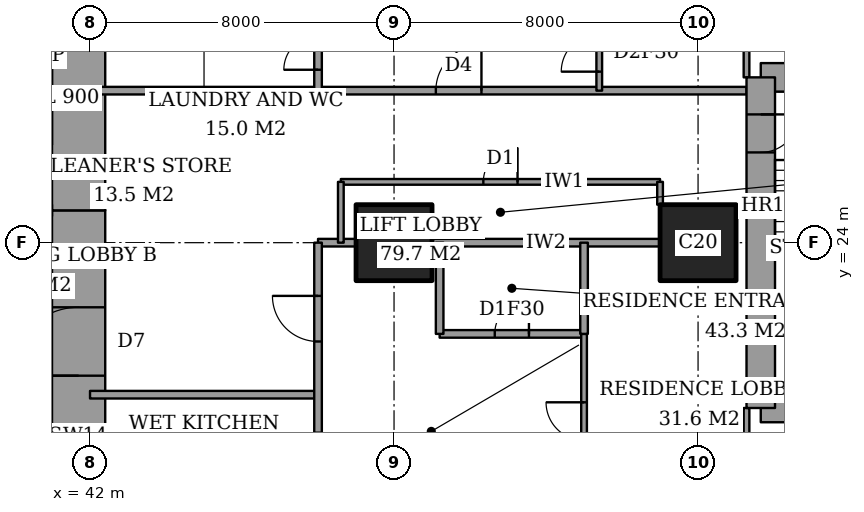
"""IFC4 building model, lengths in metres.
Left out: names, types, materials, properties, quantities, classifications, styles, units other than length and angle.
Written with IfcOpenShell. Run it as: python <this file> out.ifc"""

import sys

from ifc_helpers import new_model, si_unit, direction, frame, frame_2d, origin, origin_2d, place, context, subcontext, project, spatial, rectangle, extrude, element, fill, save


model = new_model("IFC4")
c1 = context("Model", 3, precision=1e-05, world=origin(), true_north=direction((0.0, 1.0)))
c2 = subcontext(c1, "Body", "Model", "MODEL_VIEW")
j1 = project(units=[si_unit("LENGTHUNIT", "METRE"), si_unit("PLANEANGLEUNIT", "RADIAN")], contexts=[c1])
p1 = place(None, origin())
s1 = spatial("IfcSite", under=j1, at=p1, CompositionType="ELEMENT")
p2 = place(p1, origin())
s2 = spatial("IfcBuilding", under=s1, at=p2, CompositionType="ELEMENT")
p3 = place(p2, frame((0.0, 0.0, 65.6)))
s3 = spatial("IfcBuildingStorey", under=s2, at=p3, CompositionType="ELEMENT", Elevation=65.6)
for number, where, z_axis, x_axis in (
    (1, (50.0, 24.0, 0.0), (0.0, 0.0, 1.0), (1.0, 0.0, 0.0)),
    (2, (58.0, 24.0, 0.0), (0.0, 0.0, 1.0), (1.0, 0.0, 0.0)),
):
    element("IfcColumn", number, at=place(p3, frame(where, z_axis=z_axis, x_axis=x_axis)), inside=s3, PredefinedType="COLUMN", context=c2, shape_type="SweptSolid", body=[
        extrude(rectangle(XDim=2.0, YDim=2.0, at=origin_2d()), origin(), (0.0, 0.0, 1.0), 3.6),
    ])
p4 = place(p3, frame((41.7, 13.0, 0.0), z_axis=(0.0, 0.0, 1.0), x_axis=(0.0, 1.0, 0.0)))
e3 = element("IfcWall", 3, at=p4, inside=s3, PredefinedType="SHEAR", context=c2, shape_type="SweptSolid", body=[
    extrude(rectangle(XDim=11.85, YDim=1.4, at=frame_2d((5.925, 0.0))), origin(), (0.0, 0.0, 1.0), 3.6),
])
p5 = place(p4, frame((7.5, 0.0, 0.0)))
e4 = element("IfcOpeningElement", 4, at=p5, cuts=e3, PredefinedType="OPENING", context=c2, shape_type="SweptSolid", body=[
    extrude(rectangle(XDim=1.8, YDim=2.4, at=frame_2d((0.9, 1.2))), frame((0.0, 0.71, 0.0), z_axis=(0.0, -1.0, 0.0), x_axis=(1.0, 0.0, 0.0)), (0.0, 0.0, 1.0), 1.42),
])
p6 = place(p3, frame((41.7, 24.85, 0.0), z_axis=(0.0, 0.0, 1.0), x_axis=(0.0, 1.0, 0.0)))
e5 = element("IfcWall", 5, at=p6, inside=s3, PredefinedType="SHEAR", context=c2, shape_type="SweptSolid", body=[
    extrude(rectangle(XDim=10.15, YDim=1.4, at=frame_2d((5.075, 0.0))), origin(), (0.0, 0.0, 1.0), 3.6),
])
for number, where, z_axis, x_axis in (
    (6, (59.65, 19.65, 0.0), (0.0, 0.0, 1.0), (1.0, 0.0, 0.0)),
    (7, (64.1, 28.35, 0.0), (0.0, 0.0, 1.0), (-1.0, 0.0, 0.0)),
):
    element("IfcWall", number, at=place(p3, frame(where, z_axis=z_axis, x_axis=x_axis)), inside=s3, PredefinedType="SHEAR", context=c2, shape_type="SweptSolid", body=[
        extrude(rectangle(XDim=4.45, YDim=0.75, at=frame_2d((2.225, 0.0))), origin(), (0.0, 0.0, 1.0), 3.6),
    ])
p7 = place(p3, frame((59.65, 28.35, 0.0), z_axis=(0.0, 0.0, 1.0), x_axis=(0.0, -1.0, 0.0)))
e8 = element("IfcWall", 8, at=p7, inside=s3, PredefinedType="SHEAR", context=c2, shape_type="SweptSolid", body=[
    extrude(rectangle(XDim=8.7, YDim=0.75, at=frame_2d((4.35, 0.0))), origin(), (0.0, 0.0, 1.0), 3.6),
])
p8 = place(p7, frame((0.975, 0.0, 0.0)))
e9 = element("IfcOpeningElement", 9, at=p8, cuts=e8, PredefinedType="OPENING", context=c2, shape_type="SweptSolid", body=[
    extrude(rectangle(XDim=1.0, YDim=2.1, at=frame_2d((0.5, 1.05))), frame((0.0, 0.385, 0.0), z_axis=(0.0, -1.0, 0.0), x_axis=(1.0, 0.0, 0.0)), (0.0, 0.0, 1.0), 0.77),
])
p9 = place(p3, frame((42.0, 20.0, 0.0), z_axis=(0.0, 0.0, 1.0), x_axis=(1.0, 0.0, 0.0)))
e10 = element("IfcWall", 10, at=p9, inside=s3, PredefinedType="PARTITIONING", context=c2, shape_type="SweptSolid", body=[
    extrude(rectangle(XDim=6.0, YDim=0.2, at=frame_2d((3.0, 0.0))), origin(), (0.0, 0.0, 1.0), 3.35),
])
p10 = place(p3, frame((51.2, 21.6, 0.0), z_axis=(0.0, 0.0, 1.0), x_axis=(1.0, 0.0, 0.0)))
e11 = element("IfcWall", 11, at=p10, inside=s3, PredefinedType="PARTITIONING", context=c2, shape_type="SweptSolid", body=[
    extrude(rectangle(XDim=3.8, YDim=0.2, at=frame_2d((1.9, 0.0))), origin(), (0.0, 0.0, 1.0), 3.35),
])
p11 = place(p10, frame((1.45, 0.0, 0.0)))
e12 = element("IfcOpeningElement", 12, at=p11, cuts=e11, PredefinedType="OPENING", context=c2, shape_type="SweptSolid", body=[
    extrude(rectangle(XDim=0.9, YDim=2.1, at=frame_2d((0.45, 1.05))), frame((0.0, 0.11, 0.0), z_axis=(0.0, -1.0, 0.0), x_axis=(1.0, 0.0, 0.0)), (0.0, 0.0, 1.0), 0.22),
])
p12 = place(p3, frame((48.0, 24.0, 0.0), z_axis=(0.0, 0.0, 1.0), x_axis=(1.0, 0.0, 0.0)))
e13 = element("IfcWall", 13, at=p12, inside=s3, PredefinedType="PARTITIONING", context=c2, shape_type="SweptSolid", body=[
    extrude(rectangle(XDim=1.0, YDim=0.2, at=frame_2d((0.5, 0.0))), origin(), (0.0, 0.0, 1.0), 3.35),
])
p13 = place(p3, frame((51.0, 24.0, 0.0), z_axis=(0.0, 0.0, 1.0), x_axis=(1.0, 0.0, 0.0)))
e14 = element("IfcWall", 14, at=p13, inside=s3, PredefinedType="PARTITIONING", context=c2, shape_type="SweptSolid", body=[
    extrude(rectangle(XDim=6.0, YDim=0.2, at=frame_2d((3.0, 0.0))), origin(), (0.0, 0.0, 1.0), 3.35),
])
p14 = place(p3, frame((48.6, 25.6, 0.0), z_axis=(0.0, 0.0, 1.0), x_axis=(1.0, 0.0, 0.0)))
e15 = element("IfcWall", 15, at=p14, inside=s3, PredefinedType="PARTITIONING", context=c2, shape_type="SweptSolid", body=[
    extrude(rectangle(XDim=8.4, YDim=0.15, at=frame_2d((4.2, 0.0))), origin(), (0.0, 0.0, 1.0), 3.35),
])
p15 = place(p14, frame((3.75, 0.0, 0.0)))
e16 = element("IfcOpeningElement", 16, at=p15, cuts=e15, PredefinedType="OPENING", context=c2, shape_type="SweptSolid", body=[
    extrude(rectangle(XDim=0.9, YDim=2.1, at=frame_2d((0.45, 1.05))), frame((0.0, 0.085, 0.0), z_axis=(0.0, -1.0, 0.0), x_axis=(1.0, 0.0, 0.0)), (0.0, 0.0, 1.0), 0.17),
])
p16 = place(p3, frame((42.0, 28.0, 0.0), z_axis=(0.0, 0.0, 1.0), x_axis=(1.0, 0.0, 0.0)))
e17 = element("IfcWall", 17, at=p16, inside=s3, PredefinedType="PARTITIONING", context=c2, shape_type="SweptSolid", body=[
    extrude(rectangle(XDim=17.275, YDim=0.2, at=frame_2d((8.637, 0.0))), origin(), (0.0, 0.0, 1.0), 3.35),
])
p17 = place(p16, frame((9.1, 0.0, 0.0)))
e18 = element("IfcOpeningElement", 18, at=p17, cuts=e17, PredefinedType="OPENING", context=c2, shape_type="SweptSolid", body=[
    extrude(rectangle(XDim=1.2, YDim=2.4, at=frame_2d((0.6, 1.2))), frame((0.0, 0.11, 0.0), z_axis=(0.0, -1.0, 0.0), x_axis=(1.0, 0.0, 0.0)), (0.0, 0.0, 1.0), 0.22),
])
p18 = place(p3, frame((48.0, 17.0, 0.0), z_axis=(0.0, 0.0, 1.0), x_axis=(0.0, 1.0, 0.0)))
e19 = element("IfcWall", 19, at=p18, inside=s3, PredefinedType="PARTITIONING", context=c2, shape_type="SweptSolid", body=[
    extrude(rectangle(XDim=7.0, YDim=0.2, at=frame_2d((3.5, 0.0))), origin(), (0.0, 0.0, 1.0), 3.35),
])
p19 = place(p18, frame((4.4, 0.0, 0.0)))
e20 = element("IfcOpeningElement", 20, at=p19, cuts=e19, PredefinedType="OPENING", context=c2, shape_type="SweptSolid", body=[
    extrude(rectangle(XDim=1.2, YDim=2.4, at=frame_2d((0.6, 1.2))), frame((0.0, 0.11, 0.0), z_axis=(0.0, -1.0, 0.0), x_axis=(1.0, 0.0, 0.0)), (0.0, 0.0, 1.0), 0.22),
])
p20 = place(p18, frame((1.0, 0.0, 0.0)))
e21 = element("IfcOpeningElement", 21, at=p20, cuts=e19, PredefinedType="OPENING", context=c2, shape_type="SweptSolid", body=[
    extrude(rectangle(XDim=1.0, YDim=2.1, at=frame_2d((0.5, 1.05))), frame((0.0, 0.11, 0.0), z_axis=(0.0, -1.0, 0.0), x_axis=(1.0, 0.0, 0.0)), (0.0, 0.0, 1.0), 0.22),
])
p21 = place(p3, frame((48.0, 28.0, 0.0), z_axis=(0.0, 0.0, 1.0), x_axis=(0.0, 1.0, 0.0)))
e22 = element("IfcWall", 22, at=p21, inside=s3, PredefinedType="PARTITIONING", context=c2, shape_type="SweptSolid", body=[
    extrude(rectangle(XDim=2.5, YDim=0.2, at=frame_2d((1.25, 0.0))), origin(), (0.0, 0.0, 1.0), 3.35),
])
p22 = place(p21, frame((0.55, 0.0, 0.0)))
e23 = element("IfcOpeningElement", 23, at=p22, cuts=e22, PredefinedType="OPENING", context=c2, shape_type="SweptSolid", body=[
    extrude(rectangle(XDim=0.9, YDim=2.1, at=frame_2d((0.45, 1.05))), frame((0.0, 0.11, 0.0), z_axis=(0.0, -1.0, 0.0), x_axis=(1.0, 0.0, 0.0)), (0.0, 0.0, 1.0), 0.22),
])
p23 = place(p3, frame((48.6, 24.0, 0.0), z_axis=(0.0, 0.0, 1.0), x_axis=(0.0, 1.0, 0.0)))
e24 = element("IfcWall", 24, at=p23, inside=s3, PredefinedType="PARTITIONING", context=c2, shape_type="SweptSolid", body=[
    extrude(rectangle(XDim=1.6, YDim=0.15, at=frame_2d((0.8, 0.0))), origin(), (0.0, 0.0, 1.0), 3.35),
])
for number, where, z_axis, x_axis in (
    (25, (51.2, 21.6, 0.0), (0.0, 0.0, 1.0), (0.0, 1.0, 0.0)),
    (26, (55.0, 21.6, 0.0), (0.0, 0.0, 1.0), (0.0, 1.0, 0.0)),
):
    element("IfcWall", number, at=place(p3, frame(where, z_axis=z_axis, x_axis=x_axis)), inside=s3, PredefinedType="PARTITIONING", context=c2, shape_type="SweptSolid", body=[
        extrude(rectangle(XDim=2.4, YDim=0.2, at=frame_2d((1.2, 0.0))), origin(), (0.0, 0.0, 1.0), 3.35),
    ])
p24 = place(p3, frame((55.0, 10.6, 0.0), z_axis=(0.0, 0.0, 1.0), x_axis=(0.0, 1.0, 0.0)))
e27 = element("IfcWall", 27, at=p24, inside=s3, PredefinedType="PARTITIONING", context=c2, shape_type="SweptSolid", body=[
    extrude(rectangle(XDim=11.0, YDim=0.15, at=frame_2d((5.5, 0.0))), origin(), (0.0, 0.0, 1.0), 3.35),
])
p25 = place(p24, frame((8.2, 0.0, 0.0)))
e28 = element("IfcOpeningElement", 28, at=p25, cuts=e27, PredefinedType="OPENING", context=c2, shape_type="SweptSolid", body=[
    extrude(rectangle(XDim=1.0, YDim=2.1, at=frame_2d((0.5, 1.05))), frame((0.0, 0.085, 0.0), z_axis=(0.0, -1.0, 0.0), x_axis=(1.0, 0.0, 0.0)), (0.0, 0.0, 1.0), 0.17),
])
p26 = place(p3, frame((55.4, 28.0, 0.0), z_axis=(0.0, 0.0, 1.0), x_axis=(0.0, 1.0, 0.0)))
e29 = element("IfcWall", 29, at=p26, inside=s3, PredefinedType="PARTITIONING", context=c2, shape_type="SweptSolid", body=[
    extrude(rectangle(XDim=9.2, YDim=0.15, at=frame_2d((4.6, 0.0))), origin(), (0.0, 0.0, 1.0), 3.35),
])
p27 = place(p26, frame((0.5, 0.0, 0.0)))
e30 = element("IfcOpeningElement", 30, at=p27, cuts=e29, PredefinedType="OPENING", context=c2, shape_type="SweptSolid", body=[
    extrude(rectangle(XDim=1.0, YDim=2.1, at=frame_2d((0.5, 1.05))), frame((0.0, 0.085, 0.0), z_axis=(0.0, -1.0, 0.0), x_axis=(1.0, 0.0, 0.0)), (0.0, 0.0, 1.0), 0.17),
])
p28 = place(p3, frame((57.0, 25.0, 0.0), z_axis=(0.0, 0.0, 1.0), x_axis=(0.0, 1.0, 0.0)))
e31 = element("IfcWall", 31, at=p28, inside=s3, PredefinedType="PARTITIONING", context=c2, shape_type="SweptSolid", body=[
    extrude(rectangle(XDim=0.6, YDim=0.15, at=frame_2d((0.3, 0.0))), origin(), (0.0, 0.0, 1.0), 3.35),
])
p29 = place(p3, frame((59.275, 17.2, 0.0), z_axis=(0.0, 0.0, 1.0), x_axis=(0.0, 1.0, 0.0)))
e32 = element("IfcWall", 32, at=p29, inside=s3, PredefinedType="PARTITIONING", context=c2, shape_type="SweptSolid", body=[
    extrude(rectangle(XDim=2.45, YDim=0.15, at=frame_2d((1.225, 0.0))), origin(), (0.0, 0.0, 1.0), 3.35),
])
p30 = place(p29, frame((0.538, 0.0, 0.0)))
e33 = element("IfcOpeningElement", 33, at=p30, cuts=e32, PredefinedType="OPENING", context=c2, shape_type="SweptSolid", body=[
    extrude(rectangle(XDim=1.0, YDim=2.1, at=frame_2d((0.5, 1.05))), frame((0.0, 0.085, 0.0), z_axis=(0.0, -1.0, 0.0), x_axis=(1.0, 0.0, 0.0)), (0.0, 0.0, 1.0), 0.17),
])
p31 = place(p3, frame((59.275, 28.35, 0.0), z_axis=(0.0, 0.0, 1.0), x_axis=(0.0, 1.0, 0.0)))
e34 = element("IfcWall", 34, at=p31, inside=s3, PredefinedType="PARTITIONING", context=c2, shape_type="SweptSolid", body=[
    extrude(rectangle(XDim=2.45, YDim=0.15, at=frame_2d((1.225, 0.0))), origin(), (0.0, 0.0, 1.0), 3.35),
])
p32 = place(p31, frame((0.962, 0.0, 0.0)))
e35 = element("IfcOpeningElement", 35, at=p32, cuts=e34, PredefinedType="OPENING", context=c2, shape_type="SweptSolid", body=[
    extrude(rectangle(XDim=0.9, YDim=2.1, at=frame_2d((0.45, 1.05))), frame((0.0, 0.085, 0.0), z_axis=(0.0, -1.0, 0.0), x_axis=(1.0, 0.0, 0.0)), (0.0, 0.0, 1.0), 0.17),
])
p33 = place(p25, origin())
e36 = element("IfcDoor", 36, at=p33, inside=s3, OperationType="SINGLE_SWING_LEFT", PredefinedType="DOOR", context=c2, shape_type="SweptSolid", body=[
    extrude(rectangle(XDim=1.0, YDim=2.1, at=frame_2d((0.5, 1.05))), frame((0.0, 0.025, 0.0), z_axis=(0.0, -1.0, 0.0), x_axis=(1.0, 0.0, 0.0)), (0.0, 0.0, 1.0), 0.05),
])
fill(e28, e36)
p34 = place(p11, origin())
e37 = element("IfcDoor", 37, at=p34, inside=s3, OperationType="SINGLE_SWING_LEFT", PredefinedType="DOOR", context=c2, shape_type="SweptSolid", body=[
    extrude(rectangle(XDim=0.9, YDim=2.1, at=frame_2d((0.45, 1.05))), frame((0.0, 0.025, 0.0), z_axis=(0.0, -1.0, 0.0), x_axis=(1.0, 0.0, 0.0)), (0.0, 0.0, 1.0), 0.05),
])
fill(e12, e37)
p35 = place(p19, origin())
e38 = element("IfcDoor", 38, at=p35, inside=s3, OperationType="SINGLE_SWING_LEFT", PredefinedType="DOOR", context=c2, shape_type="SweptSolid", body=[
    extrude(rectangle(XDim=1.2, YDim=2.4, at=frame_2d((0.6, 1.2))), frame((0.0, 0.025, 0.0), z_axis=(0.0, -1.0, 0.0), x_axis=(1.0, 0.0, 0.0)), (0.0, 0.0, 1.0), 0.05),
])
fill(e20, e38)
p36 = place(p27, origin())
e39 = element("IfcDoor", 39, at=p36, inside=s3, OperationType="SINGLE_SWING_RIGHT", PredefinedType="DOOR", context=c2, shape_type="SweptSolid", body=[
    extrude(rectangle(XDim=1.0, YDim=2.1, at=frame_2d((0.5, 1.05))), frame((0.0, 0.025, 0.0), z_axis=(0.0, -1.0, 0.0), x_axis=(1.0, 0.0, 0.0)), (0.0, 0.0, 1.0), 0.05),
])
fill(e30, e39)
p37 = place(p17, origin())
e40 = element("IfcDoor", 40, at=p37, inside=s3, OperationType="SINGLE_SWING_LEFT", PredefinedType="DOOR", context=c2, shape_type="SweptSolid", body=[
    extrude(rectangle(XDim=1.2, YDim=2.4, at=frame_2d((0.6, 1.2))), frame((0.0, 0.025, 0.0), z_axis=(0.0, -1.0, 0.0), x_axis=(1.0, 0.0, 0.0)), (0.0, 0.0, 1.0), 0.05),
])
fill(e18, e40)
p38 = place(p22, origin())
e41 = element("IfcDoor", 41, at=p38, inside=s3, OperationType="SINGLE_SWING_RIGHT", PredefinedType="DOOR", context=c2, shape_type="SweptSolid", body=[
    extrude(rectangle(XDim=0.9, YDim=2.1, at=frame_2d((0.45, 1.05))), frame((0.0, 0.025, 0.0), z_axis=(0.0, -1.0, 0.0), x_axis=(1.0, 0.0, 0.0)), (0.0, 0.0, 1.0), 0.05),
])
fill(e23, e41)
p39 = place(p15, origin())
e42 = element("IfcDoor", 42, at=p39, inside=s3, OperationType="SINGLE_SWING_LEFT", PredefinedType="DOOR", context=c2, shape_type="SweptSolid", body=[
    extrude(rectangle(XDim=0.9, YDim=2.1, at=frame_2d((0.45, 1.05))), frame((0.0, 0.025, 0.0), z_axis=(0.0, -1.0, 0.0), x_axis=(1.0, 0.0, 0.0)), (0.0, 0.0, 1.0), 0.05),
])
fill(e16, e42)
p40 = place(p5, origin())
e43 = element("IfcDoor", 43, at=p40, inside=s3, OperationType="DOUBLE_DOOR_DOUBLE_SWING", PredefinedType="DOOR", context=c2, shape_type="SweptSolid", body=[
    extrude(rectangle(XDim=1.8, YDim=2.4, at=frame_2d((0.9, 1.2))), frame((0.0, 0.025, 0.0), z_axis=(0.0, -1.0, 0.0), x_axis=(1.0, 0.0, 0.0)), (0.0, 0.0, 1.0), 0.05),
])
fill(e4, e43)
p41 = place(p8, origin())
e44 = element("IfcDoor", 44, at=p41, inside=s3, OperationType="SINGLE_SWING_RIGHT", PredefinedType="DOOR", context=c2, shape_type="SweptSolid", body=[
    extrude(rectangle(XDim=1.0, YDim=2.1, at=frame_2d((0.5, 1.05))), frame((0.0, 0.025, 0.0), z_axis=(0.0, -1.0, 0.0), x_axis=(1.0, 0.0, 0.0)), (0.0, 0.0, 1.0), 0.05),
])
fill(e9, e44)
save(model, sys.argv[1])
